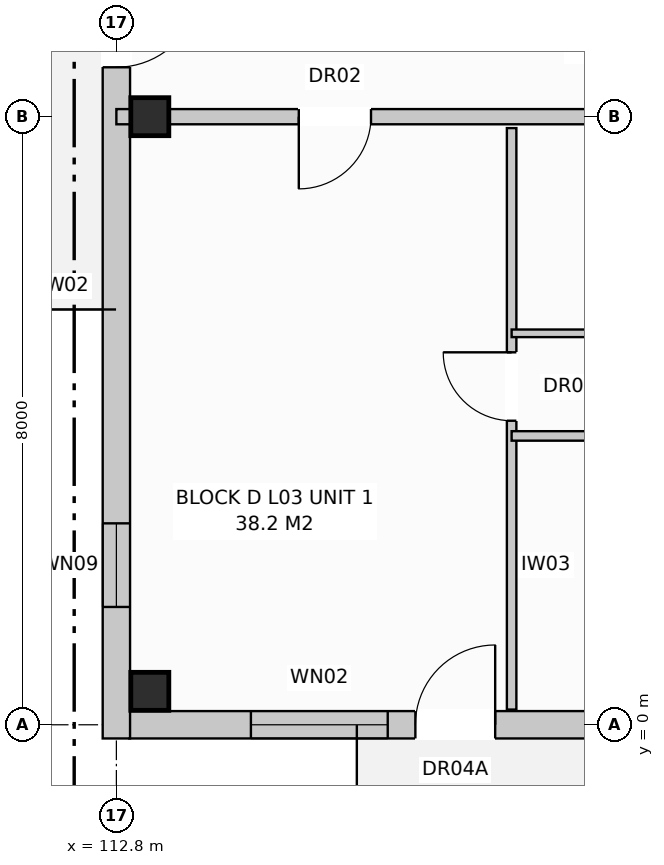
"""IFC4 building model, lengths in metres.
Left out: names, types, materials, properties, quantities, classifications, styles, units other than length and angle.
Written with IfcOpenShell. Run it as: python <this file> out.ifc"""

import sys

from ifc_helpers import new_model, si_unit, direction, frame, frame_2d, origin, origin_with_axes, origin_2d, place, context, subcontext, project, spatial, rectangle, extrude, element, fill, save


model = new_model("IFC4")
c1 = context("Model", 3, precision=1e-05, world=origin(), true_north=direction((0.0, 1.0)))
c2 = subcontext(c1, "Body", "Model", "MODEL_VIEW")
j1 = project(units=[si_unit("LENGTHUNIT", "METRE"), si_unit("PLANEANGLEUNIT", "RADIAN")], contexts=[c1])
p1 = place(None, origin())
s1 = spatial("IfcSite", under=j1, at=p1, CompositionType="ELEMENT")
p2 = place(p1, origin())
s2 = spatial("IfcBuilding", under=s1, at=p2, CompositionType="ELEMENT")
p3 = place(p2, frame((0.0, 0.0, 11.2)))
s3 = spatial("IfcBuildingStorey", under=s2, at=p3, CompositionType="ELEMENT", Elevation=11.2)
for number, where, z_axis, x_axis in (
    (1, (113.24, 0.44, 0.0), (0.0, 0.0, 1.0), (1.0, 0.0, 0.0)),
    (2, (113.24, 8.0, 0.0), (0.0, 0.0, 1.0), (1.0, 0.0, 0.0)),
):
    element("IfcColumn", number, at=place(p3, frame(where, z_axis=z_axis, x_axis=x_axis)), inside=s3, PredefinedType="COLUMN", context=c2, shape_type="SweptSolid", body=[
        extrude(rectangle(XDim=0.5, YDim=0.5, at=origin_2d()), origin(), (0.0, 0.0, 1.0), 3.2),
    ])
p4 = place(p3, frame((112.97, 0.0, 0.0), z_axis=(0.0, 0.0, 1.0), x_axis=(1.0, 0.0, 0.0)))
e3 = element("IfcWall", 3, at=p4, inside=s3, PredefinedType="STANDARD", context=c2, shape_type="SweptSolid", body=[
    extrude(rectangle(XDim=54.86, YDim=0.36, at=frame_2d((27.43, 0.0))), origin(), (0.0, 0.0, 1.0), 2.94),
])
p5 = place(p4, frame((3.764, 0.0, 0.0)))
e4 = element("IfcOpeningElement", 4, at=p5, cuts=e3, PredefinedType="OPENING", context=c2, shape_type="SweptSolid", body=[
    extrude(rectangle(XDim=1.05, YDim=2.12, at=frame_2d((0.525, 1.06))), frame((0.0, 0.192, 0.0), z_axis=(0.0, -1.0, 0.0), x_axis=(1.0, 0.0, 0.0)), (0.0, 0.0, 1.0), 0.384),
])
p6 = place(p4, frame((16.558, 0.0, 0.0)))
e5 = element("IfcOpeningElement", 5, at=p6, cuts=e3, PredefinedType="OPENING", context=c2, shape_type="SweptSolid", body=[
    extrude(rectangle(XDim=1.05, YDim=2.12, at=frame_2d((0.525, 1.06))), frame((0.0, 0.192, 0.0), z_axis=(0.0, -1.0, 0.0), x_axis=(1.0, 0.0, 0.0)), (0.0, 0.0, 1.0), 0.384),
])
p7 = place(p4, frame((30.058, 0.0, 0.0)))
e6 = element("IfcOpeningElement", 6, at=p7, cuts=e3, PredefinedType="OPENING", context=c2, shape_type="SweptSolid", body=[
    extrude(rectangle(XDim=1.05, YDim=2.12, at=frame_2d((0.525, 1.06))), frame((0.0, 0.192, 0.0), z_axis=(0.0, -1.0, 0.0), x_axis=(1.0, 0.0, 0.0)), (0.0, 0.0, 1.0), 0.384),
])
p8 = place(p4, frame((45.158, 0.0, 0.0)))
e7 = element("IfcOpeningElement", 7, at=p8, cuts=e3, PredefinedType="OPENING", context=c2, shape_type="SweptSolid", body=[
    extrude(rectangle(XDim=1.05, YDim=2.12, at=frame_2d((0.525, 1.06))), frame((0.0, 0.192, 0.0), z_axis=(0.0, -1.0, 0.0), x_axis=(1.0, 0.0, 0.0)), (0.0, 0.0, 1.0), 0.384),
])
p9 = place(p4, frame((1.6, 0.0, 0.8)))
e8 = element("IfcOpeningElement", 8, at=p9, cuts=e3, PredefinedType="OPENING", context=c2, shape_type="SweptSolid", body=[
    extrude(rectangle(XDim=1.8, YDim=1.7, at=frame_2d((0.9, 0.85))), frame((0.0, 0.192, 0.0), z_axis=(0.0, -1.0, 0.0), x_axis=(1.0, 0.0, 0.0)), (0.0, 0.0, 1.0), 0.384),
])
p10 = place(p4, frame((7.65, 0.0, 0.72)))
e9 = element("IfcOpeningElement", 9, at=p10, cuts=e3, PredefinedType="OPENING", context=c2, shape_type="SweptSolid", body=[
    extrude(rectangle(XDim=1.1, YDim=1.5, at=frame_2d((0.55, 0.75))), frame((0.0, 0.192, 0.0), z_axis=(0.0, -1.0, 0.0), x_axis=(1.0, 0.0, 0.0)), (0.0, 0.0, 1.0), 0.384),
])
p11 = place(p4, frame((10.425, 0.0, 0.8)))
e10 = element("IfcOpeningElement", 10, at=p11, cuts=e3, PredefinedType="OPENING", context=c2, shape_type="SweptSolid", body=[
    extrude(rectangle(XDim=1.95, YDim=1.65, at=frame_2d((0.975, 0.825))), frame((0.0, 0.192, 0.0), z_axis=(0.0, -1.0, 0.0), x_axis=(1.0, 0.0, 0.0)), (0.0, 0.0, 1.0), 0.384),
])
p12 = place(p4, frame((14.85, 0.0, 0.72)))
e11 = element("IfcOpeningElement", 11, at=p12, cuts=e3, PredefinedType="OPENING", context=c2, shape_type="SweptSolid", body=[
    extrude(rectangle(XDim=1.1, YDim=1.5, at=frame_2d((0.55, 0.75))), frame((0.0, 0.192, 0.0), z_axis=(0.0, -1.0, 0.0), x_axis=(1.0, 0.0, 0.0)), (0.0, 0.0, 1.0), 0.384),
])
p13 = place(p4, frame((18.15, 0.0, 0.72)))
e12 = element("IfcOpeningElement", 12, at=p13, cuts=e3, PredefinedType="OPENING", context=c2, shape_type="SweptSolid", body=[
    extrude(rectangle(XDim=1.9, YDim=1.85, at=frame_2d((0.95, 0.925))), frame((0.0, 0.192, 0.0), z_axis=(0.0, -1.0, 0.0), x_axis=(1.0, 0.0, 0.0)), (0.0, 0.0, 1.0), 0.384),
])
p14 = place(p4, frame((24.25, 0.0, 0.72)))
e13 = element("IfcOpeningElement", 13, at=p14, cuts=e3, PredefinedType="OPENING", context=c2, shape_type="SweptSolid", body=[
    extrude(rectangle(XDim=1.1, YDim=1.5, at=frame_2d((0.55, 0.75))), frame((0.0, 0.192, 0.0), z_axis=(0.0, -1.0, 0.0), x_axis=(1.0, 0.0, 0.0)), (0.0, 0.0, 1.0), 0.384),
])
p15 = place(p4, frame((28.35, 0.0, 0.72)))
e14 = element("IfcOpeningElement", 14, at=p15, cuts=e3, PredefinedType="OPENING", context=c2, shape_type="SweptSolid", body=[
    extrude(rectangle(XDim=1.1, YDim=1.5, at=frame_2d((0.55, 0.75))), frame((0.0, 0.192, 0.0), z_axis=(0.0, -1.0, 0.0), x_axis=(1.0, 0.0, 0.0)), (0.0, 0.0, 1.0), 0.384),
])
p16 = place(p4, frame((31.85, 0.0, 0.72)))
e15 = element("IfcOpeningElement", 15, at=p16, cuts=e3, PredefinedType="OPENING", context=c2, shape_type="SweptSolid", body=[
    extrude(rectangle(XDim=1.9, YDim=1.85, at=frame_2d((0.95, 0.925))), frame((0.0, 0.192, 0.0), z_axis=(0.0, -1.0, 0.0), x_axis=(1.0, 0.0, 0.0)), (0.0, 0.0, 1.0), 0.384),
])
p17 = place(p4, frame((35.325, 0.0, 0.8)))
e16 = element("IfcOpeningElement", 16, at=p17, cuts=e3, PredefinedType="OPENING", context=c2, shape_type="SweptSolid", body=[
    extrude(rectangle(XDim=1.95, YDim=1.65, at=frame_2d((0.975, 0.825))), frame((0.0, 0.192, 0.0), z_axis=(0.0, -1.0, 0.0), x_axis=(1.0, 0.0, 0.0)), (0.0, 0.0, 1.0), 0.384),
])
p18 = place(p4, frame((39.15, 0.0, 0.72)))
e17 = element("IfcOpeningElement", 17, at=p18, cuts=e3, PredefinedType="OPENING", context=c2, shape_type="SweptSolid", body=[
    extrude(rectangle(XDim=1.1, YDim=1.5, at=frame_2d((0.55, 0.75))), frame((0.0, 0.192, 0.0), z_axis=(0.0, -1.0, 0.0), x_axis=(1.0, 0.0, 0.0)), (0.0, 0.0, 1.0), 0.384),
])
p19 = place(p4, frame((42.95, 0.0, 0.8)))
e18 = element("IfcOpeningElement", 18, at=p19, cuts=e3, PredefinedType="OPENING", context=c2, shape_type="SweptSolid", body=[
    extrude(rectangle(XDim=1.9, YDim=1.85, at=frame_2d((0.95, 0.925))), frame((0.0, 0.192, 0.0), z_axis=(0.0, -1.0, 0.0), x_axis=(1.0, 0.0, 0.0)), (0.0, 0.0, 1.0), 0.384),
])
p20 = place(p4, frame((48.583, 0.0, 0.8)))
e19 = element("IfcOpeningElement", 19, at=p20, cuts=e3, PredefinedType="OPENING", context=c2, shape_type="SweptSolid", body=[
    extrude(rectangle(XDim=1.95, YDim=1.65, at=frame_2d((0.975, 0.825))), frame((0.0, 0.192, 0.0), z_axis=(0.0, -1.0, 0.0), x_axis=(1.0, 0.0, 0.0)), (0.0, 0.0, 1.0), 0.384),
])
p21 = place(p4, frame((52.25, 0.0, 0.72)))
e20 = element("IfcOpeningElement", 20, at=p21, cuts=e3, PredefinedType="OPENING", context=c2, shape_type="SweptSolid", body=[
    extrude(rectangle(XDim=1.1, YDim=1.5, at=frame_2d((0.55, 0.75))), frame((0.0, 0.192, 0.0), z_axis=(0.0, -1.0, 0.0), x_axis=(1.0, 0.0, 0.0)), (0.0, 0.0, 1.0), 0.384),
])
p22 = place(p3, frame((112.8, -0.18, 0.0), z_axis=(0.0, 0.0, 1.0), x_axis=(0.0, 1.0, 0.0)))
e21 = element("IfcWall", 21, at=p22, inside=s3, PredefinedType="STANDARD", context=c2, shape_type="SweptSolid", body=[
    extrude(rectangle(XDim=18.76, YDim=0.36, at=frame_2d((9.38, 0.0))), origin(), (0.0, 0.0, 1.0), 2.94),
])
p23 = place(p22, frame((8.83, 0.0, 0.0)))
e22 = element("IfcOpeningElement", 22, at=p23, cuts=e21, PredefinedType="OPENING", context=c2, shape_type="SweptSolid", body=[
    extrude(rectangle(XDim=1.1, YDim=2.1, at=frame_2d((0.55, 1.05))), frame((0.0, 0.192, 0.0), z_axis=(0.0, -1.0, 0.0), x_axis=(1.0, 0.0, 0.0)), (0.0, 0.0, 1.0), 0.384),
])
p24 = place(p22, frame((1.73, 0.0, 0.72)))
e23 = element("IfcOpeningElement", 23, at=p24, cuts=e21, PredefinedType="OPENING", context=c2, shape_type="SweptSolid", body=[
    extrude(rectangle(XDim=1.1, YDim=1.5, at=frame_2d((0.55, 0.75))), frame((0.0, 0.192, 0.0), z_axis=(0.0, -1.0, 0.0), x_axis=(1.0, 0.0, 0.0)), (0.0, 0.0, 1.0), 0.384),
])
p25 = place(p22, frame((15.93, 0.0, 0.72)))
e24 = element("IfcOpeningElement", 24, at=p25, cuts=e21, PredefinedType="OPENING", context=c2, shape_type="SweptSolid", body=[
    extrude(rectangle(XDim=1.1, YDim=1.5, at=frame_2d((0.55, 0.75))), frame((0.0, 0.192, 0.0), z_axis=(0.0, -1.0, 0.0), x_axis=(1.0, 0.0, 0.0)), (0.0, 0.0, 1.0), 0.384),
])
p26 = place(p3, frame((112.8, 8.0, 0.0), z_axis=(0.0, 0.0, 1.0), x_axis=(1.0, 0.0, 0.0)))
e25 = element("IfcWall", 25, at=p26, inside=s3, PredefinedType="PARTITIONING", context=c2, shape_type="SweptSolid", body=[
    extrude(rectangle(XDim=13.8, YDim=0.2, at=frame_2d((6.9, 0.0))), origin(), (0.0, 0.0, 1.0), 2.38),
])
p27 = place(p26, frame((2.4, 0.0, 0.0)))
e26 = element("IfcOpeningElement", 26, at=p27, cuts=e25, PredefinedType="OPENING", context=c2, shape_type="SweptSolid", body=[
    extrude(rectangle(XDim=0.95, YDim=2.15, at=frame_2d((0.475, 1.075))), frame((0.0, 0.112, 0.0), z_axis=(0.0, -1.0, 0.0), x_axis=(1.0, 0.0, 0.0)), (0.0, 0.0, 1.0), 0.224),
])
p28 = place(p3, frame((118.0, 7.85, 0.0), z_axis=(0.0, 0.0, 1.0), x_axis=(0.0, -1.0, 0.0)))
e27 = element("IfcWall", 27, at=p28, inside=s3, PredefinedType="PARTITIONING", context=c2, shape_type="SweptSolid", body=[
    extrude(rectangle(XDim=7.65, YDim=0.125, at=frame_2d((3.825, 0.0))), origin(), (0.0, 0.0, 1.0), 2.94),
])
p29 = place(p28, frame((2.95, 0.0, 0.0)))
e28 = element("IfcOpeningElement", 28, at=p29, cuts=e27, PredefinedType="OPENING", context=c2, shape_type="SweptSolid", body=[
    extrude(rectangle(XDim=0.9, YDim=2.1, at=frame_2d((0.45, 1.05))), frame((0.0, 0.074, 0.0), z_axis=(0.0, -1.0, 0.0), x_axis=(1.0, 0.0, 0.0)), (0.0, 0.0, 1.0), 0.149),
])
p30 = place(p3, frame((118.0, 5.15, 0.0), z_axis=(0.0, 0.0, 1.0), x_axis=(1.0, 0.0, 0.0)))
e29 = element("IfcWall", 29, at=p30, inside=s3, PredefinedType="PARTITIONING", context=c2, shape_type="SweptSolid", body=[
    extrude(rectangle(XDim=8.5, YDim=0.1, at=frame_2d((4.25, 0.0))), origin(), (0.0, 0.0, 1.0), 2.94),
])
p31 = place(p30, frame((1.0, 0.0, 0.0)))
e30 = element("IfcOpeningElement", 30, at=p31, cuts=e29, PredefinedType="OPENING", context=c2, shape_type="SweptSolid", body=[
    extrude(rectangle(XDim=0.85, YDim=2.1, at=frame_2d((0.425, 1.05))), frame((0.0, 0.062, 0.0), z_axis=(0.0, -1.0, 0.0), x_axis=(1.0, 0.0, 0.0)), (0.0, 0.0, 1.0), 0.124),
])
p32 = place(p30, frame((3.4, 0.0, 0.0)))
e31 = element("IfcOpeningElement", 31, at=p32, cuts=e29, PredefinedType="OPENING", context=c2, shape_type="SweptSolid", body=[
    extrude(rectangle(XDim=0.85, YDim=2.05, at=frame_2d((0.425, 1.025))), frame((0.0, 0.062, 0.0), z_axis=(0.0, -1.0, 0.0), x_axis=(1.0, 0.0, 0.0)), (0.0, 0.0, 1.0), 0.124),
])
p33 = place(p30, frame((6.2, 0.0, 0.0)))
e32 = element("IfcOpeningElement", 32, at=p33, cuts=e29, PredefinedType="OPENING", context=c2, shape_type="SweptSolid", body=[
    extrude(rectangle(XDim=0.85, YDim=2.05, at=frame_2d((0.425, 1.025))), frame((0.0, 0.062, 0.0), z_axis=(0.0, -1.0, 0.0), x_axis=(1.0, 0.0, 0.0)), (0.0, 0.0, 1.0), 0.124),
])
p34 = place(p3, frame((118.0, 3.8, 0.0), z_axis=(0.0, 0.0, 1.0), x_axis=(1.0, 0.0, 0.0)))
e33 = element("IfcWall", 33, at=p34, inside=s3, PredefinedType="PARTITIONING", context=c2, shape_type="SweptSolid", body=[
    extrude(rectangle(XDim=8.5, YDim=0.125, at=frame_2d((4.25, 0.0))), origin(), (0.0, 0.0, 1.0), 2.94),
])
p35 = place(p34, frame((1.5, 0.0, 0.0)))
e34 = element("IfcOpeningElement", 34, at=p35, cuts=e33, PredefinedType="OPENING", context=c2, shape_type="SweptSolid", body=[
    extrude(rectangle(XDim=0.9, YDim=2.1, at=frame_2d((0.45, 1.05))), frame((0.0, 0.074, 0.0), z_axis=(0.0, -1.0, 0.0), x_axis=(1.0, 0.0, 0.0)), (0.0, 0.0, 1.0), 0.149),
])
p36 = place(p34, frame((5.6, 0.0, 0.0)))
e35 = element("IfcOpeningElement", 35, at=p36, cuts=e33, PredefinedType="OPENING", context=c2, shape_type="SweptSolid", body=[
    extrude(rectangle(XDim=0.9, YDim=2.1, at=frame_2d((0.45, 1.05))), frame((0.0, 0.074, 0.0), z_axis=(0.0, -1.0, 0.0), x_axis=(1.0, 0.0, 0.0)), (0.0, 0.0, 1.0), 0.149),
])
p37 = place(p5, origin_with_axes())
e36 = element("IfcDoor", 36, at=p37, inside=s3, OperationType="SINGLE_SWING_RIGHT", PredefinedType="DOOR", context=c2, shape_type="SweptSolid", body=[
    extrude(rectangle(XDim=1.05, YDim=2.12, at=frame_2d((0.525, 1.06))), frame((0.0, 0.025, 0.0), z_axis=(0.0, -1.0, 0.0), x_axis=(1.0, 0.0, 0.0)), (0.0, 0.0, 1.0), 0.05),
])
fill(e4, e36)
p38 = place(p9, origin_with_axes())
e37 = element("IfcWindow", 37, at=p38, inside=s3, PartitioningType="SINGLE_PANEL", PredefinedType="WINDOW", context=c2, shape_type="SweptSolid", body=[
    extrude(rectangle(XDim=1.8, YDim=1.7, at=frame_2d((0.9, 0.85))), frame((0.0, 0.03, 0.0), z_axis=(0.0, -1.0, 0.0), x_axis=(1.0, 0.0, 0.0)), (0.0, 0.0, 1.0), 0.06),
])
fill(e8, e37)
p39 = place(p23, frame((1.1, 0.0, 0.0), z_axis=(0.0, 0.0, 1.0), x_axis=(-1.0, 0.0, 0.0)))
e38 = element("IfcDoor", 38, at=p39, inside=s3, OperationType="SINGLE_SWING_RIGHT", PredefinedType="DOOR", context=c2, shape_type="SweptSolid", body=[
    extrude(rectangle(XDim=1.1, YDim=2.1, at=frame_2d((0.55, 1.05))), frame((0.0, 0.025, 0.0), z_axis=(0.0, -1.0, 0.0), x_axis=(1.0, 0.0, 0.0)), (0.0, 0.0, 1.0), 0.05),
])
fill(e22, e38)
p40 = place(p24, origin_with_axes())
e39 = element("IfcWindow", 39, at=p40, inside=s3, PartitioningType="SINGLE_PANEL", PredefinedType="WINDOW", context=c2, shape_type="SweptSolid", body=[
    extrude(rectangle(XDim=1.1, YDim=1.5, at=frame_2d((0.55, 0.75))), frame((0.0, 0.03, 0.0), z_axis=(0.0, -1.0, 0.0), x_axis=(1.0, 0.0, 0.0)), (0.0, 0.0, 1.0), 0.06),
])
fill(e23, e39)
p41 = place(p27, frame((0.95, 0.0, 0.0), z_axis=(0.0, 0.0, 1.0), x_axis=(-1.0, 0.0, 0.0)))
e40 = element("IfcDoor", 40, at=p41, inside=s3, OperationType="SINGLE_SWING_LEFT", PredefinedType="DOOR", context=c2, shape_type="SweptSolid", body=[
    extrude(rectangle(XDim=0.95, YDim=2.15, at=frame_2d((0.475, 1.075))), frame((0.0, 0.025, 0.0), z_axis=(0.0, -1.0, 0.0), x_axis=(1.0, 0.0, 0.0)), (0.0, 0.0, 1.0), 0.05),
])
fill(e26, e40)
p42 = place(p29, frame((0.9, 0.0, 0.0), z_axis=(0.0, 0.0, 1.0), x_axis=(-1.0, 0.0, 0.0)))
e41 = element("IfcDoor", 41, at=p42, inside=s3, OperationType="SINGLE_SWING_LEFT", PredefinedType="DOOR", context=c2, shape_type="SweptSolid", body=[
    extrude(rectangle(XDim=0.9, YDim=2.1, at=frame_2d((0.45, 1.05))), frame((0.0, 0.025, 0.0), z_axis=(0.0, -1.0, 0.0), x_axis=(1.0, 0.0, 0.0)), (0.0, 0.0, 1.0), 0.05),
])
fill(e28, e41)
save(model, sys.argv[1])
